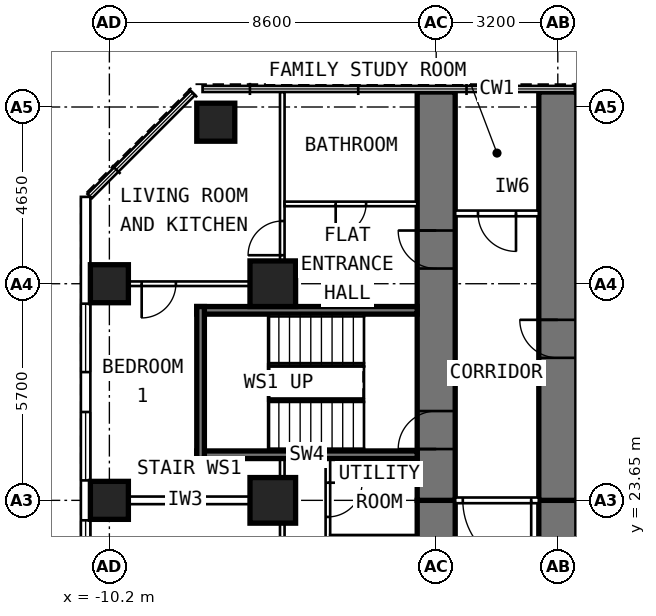
"""IFC4 building model, lengths in metres.
Left out: names, types, materials, properties, quantities, classifications, styles, units other than length and angle.
Written with IfcOpenShell. Run it as: python <this file> out.ifc"""

import sys

from ifc_helpers import new_model, si_unit, direction, frame, frame_2d, origin, origin_2d, place, context, subcontext, project, spatial, rectangle, extrude, element, fill, save


model = new_model("IFC4")
c1 = context("Model", 3, precision=1e-05, world=origin(), true_north=direction((0.0, 1.0)))
c2 = subcontext(c1, "Body", "Model", "MODEL_VIEW")
j1 = project(units=[si_unit("LENGTHUNIT", "METRE"), si_unit("PLANEANGLEUNIT", "RADIAN")], contexts=[c1])
p1 = place(None, origin())
s1 = spatial("IfcSite", under=j1, at=p1, CompositionType="ELEMENT")
p2 = place(p1, origin())
s2 = spatial("IfcBuilding", under=s1, at=p2, CompositionType="ELEMENT")
p3 = place(p2, frame((0.0, 0.0, 50.2)))
s3 = spatial("IfcBuildingStorey", under=s2, at=p3, CompositionType="ELEMENT", Elevation=50.2)
for number, where, z_axis, x_axis in (
    (1, (-10.2, 23.65, 0.0), (0.0, 0.0, 1.0), (0.0, 1.0, 0.0)),
    (2, (-10.2, 29.35, 0.0), (0.0, 0.0, 1.0), (0.0, 1.0, 0.0)),
    (3, (-7.4, 33.6, 0.0), (0.0, 0.0, 1.0), (0.0, 1.0, 0.0)),
):
    element("IfcColumn", number, at=place(p3, frame(where, z_axis=z_axis, x_axis=x_axis)), inside=s3, PredefinedType="COLUMN", context=c2, shape_type="SweptSolid", body=[
        extrude(rectangle(XDim=1.0, YDim=1.0, at=origin_2d()), origin(), (0.0, 0.0, 1.0), 3.6),
    ])
for number, where, z_axis, x_axis in (
    (4, (-5.9, 23.65, 0.0), (0.0, 0.0, 1.0), (0.0, 1.0, 0.0)),
    (5, (-5.9, 29.35, 0.0), (0.0, 0.0, 1.0), (0.0, 1.0, 0.0)),
):
    element("IfcColumn", number, at=place(p3, frame(where, z_axis=z_axis, x_axis=x_axis)), inside=s3, PredefinedType="COLUMN", context=c2, shape_type="SweptSolid", body=[
        extrude(rectangle(XDim=1.2, YDim=1.2, at=origin_2d()), origin(), (0.0, 0.0, 1.0), 3.6),
    ])
p4 = place(p3, frame((-1.6, 17.95, 0.0), z_axis=(0.0, 0.0, 1.0), x_axis=(0.0, 1.0, 0.0)))
e6 = element("IfcWall", 6, at=p4, inside=s3, PredefinedType="SHEAR", context=c2, shape_type="SweptSolid", body=[
    extrude(rectangle(XDim=5.7, YDim=1.0, at=frame_2d((2.85, 0.0))), origin(), (0.0, 0.0, 1.0), 3.6),
])
p5 = place(p3, frame((-1.6, 23.65, 0.0), z_axis=(0.0, 0.0, 1.0), x_axis=(0.0, 1.0, 0.0)))
e7 = element("IfcWall", 7, at=p5, inside=s3, PredefinedType="SHEAR", context=c2, shape_type="SweptSolid", body=[
    extrude(rectangle(XDim=10.745, YDim=1.0, at=frame_2d((5.373, 0.0))), origin(), (0.0, 0.0, 1.0), 3.6),
])
p6 = place(p5, frame((6.1, 0.0, 0.0)))
e8 = element("IfcOpeningElement", 8, at=p6, cuts=e7, PredefinedType="OPENING", context=c2, shape_type="SweptSolid", body=[
    extrude(rectangle(XDim=1.0, YDim=2.1, at=frame_2d((0.5, 1.05))), frame((0.0, 0.512, 0.0), z_axis=(0.0, -1.0, 0.0), x_axis=(1.0, 0.0, 0.0)), (0.0, 0.0, 1.0), 1.024),
])
p7 = place(p5, frame((1.35, 0.0, 0.0)))
e9 = element("IfcOpeningElement", 9, at=p7, cuts=e7, PredefinedType="OPENING", context=c2, shape_type="SweptSolid", body=[
    extrude(rectangle(XDim=1.0, YDim=2.1, at=frame_2d((0.5, 1.05))), frame((0.0, 0.512, 0.0), z_axis=(0.0, -1.0, 0.0), x_axis=(1.0, 0.0, 0.0)), (0.0, 0.0, 1.0), 1.024),
])
p8 = place(p3, frame((1.6, 17.95, 0.0), z_axis=(0.0, 0.0, 1.0), x_axis=(0.0, 1.0, 0.0)))
e10 = element("IfcWall", 10, at=p8, inside=s3, PredefinedType="SHEAR", context=c2, shape_type="SweptSolid", body=[
    extrude(rectangle(XDim=5.7, YDim=1.0, at=frame_2d((2.85, 0.0))), origin(), (0.0, 0.0, 1.0), 3.6),
])
p9 = place(p3, frame((1.6, 23.65, 0.0), z_axis=(0.0, 0.0, 1.0), x_axis=(0.0, 1.0, 0.0)))
e11 = element("IfcWall", 11, at=p9, inside=s3, PredefinedType="SHEAR", context=c2, shape_type="SweptSolid", body=[
    extrude(rectangle(XDim=10.745, YDim=1.0, at=frame_2d((5.373, 0.0))), origin(), (0.0, 0.0, 1.0), 3.6),
])
p10 = place(p9, frame((3.75, 0.0, 0.0)))
e12 = element("IfcOpeningElement", 12, at=p10, cuts=e11, PredefinedType="OPENING", context=c2, shape_type="SweptSolid", body=[
    extrude(rectangle(XDim=1.0, YDim=2.1, at=frame_2d((0.5, 1.05))), frame((0.0, 0.512, 0.0), z_axis=(0.0, -1.0, 0.0), x_axis=(1.0, 0.0, 0.0)), (0.0, 0.0, 1.0), 1.024),
])
p11 = place(p3, frame((-10.825, 6.148, 0.0), z_axis=(0.0, 0.0, 1.0), x_axis=(0.0, 1.0, 0.0)))
e13 = element("IfcWall", 13, at=p11, inside=s3, PredefinedType="SOLIDWALL", context=c2, shape_type="SweptSolid", body=[
    extrude(rectangle(XDim=25.487, YDim=0.25, at=frame_2d((12.744, 0.0))), origin(), (0.0, 0.0, 1.0), 3.35),
])
p12 = place(p11, frame((0.927, 0.0, 0.8)))
e14 = element("IfcOpeningElement", 14, at=p12, cuts=e13, PredefinedType="OPENING", context=c2, shape_type="SweptSolid", body=[
    extrude(rectangle(XDim=1.8, YDim=1.8, at=frame_2d((0.9, 0.9))), frame((0.0, 0.137, 0.0), z_axis=(0.0, -1.0, 0.0), x_axis=(1.0, 0.0, 0.0)), (0.0, 0.0, 1.0), 0.274),
])
p13 = place(p11, frame((3.777, 0.0, 0.8)))
e15 = element("IfcOpeningElement", 15, at=p13, cuts=e13, PredefinedType="OPENING", context=c2, shape_type="SweptSolid", body=[
    extrude(rectangle(XDim=1.8, YDim=1.8, at=frame_2d((0.9, 0.9))), frame((0.0, 0.137, 0.0), z_axis=(0.0, -1.0, 0.0), x_axis=(1.0, 0.0, 0.0)), (0.0, 0.0, 1.0), 0.274),
])
p14 = place(p11, frame((6.627, 0.0, 0.8)))
e16 = element("IfcOpeningElement", 16, at=p14, cuts=e13, PredefinedType="OPENING", context=c2, shape_type="SweptSolid", body=[
    extrude(rectangle(XDim=1.8, YDim=1.8, at=frame_2d((0.9, 0.9))), frame((0.0, 0.137, 0.0), z_axis=(0.0, -1.0, 0.0), x_axis=(1.0, 0.0, 0.0)), (0.0, 0.0, 1.0), 0.274),
])
p15 = place(p11, frame((9.477, 0.0, 0.8)))
e17 = element("IfcOpeningElement", 17, at=p15, cuts=e13, PredefinedType="OPENING", context=c2, shape_type="SweptSolid", body=[
    extrude(rectangle(XDim=1.8, YDim=1.8, at=frame_2d((0.9, 0.9))), frame((0.0, 0.137, 0.0), z_axis=(0.0, -1.0, 0.0), x_axis=(1.0, 0.0, 0.0)), (0.0, 0.0, 1.0), 0.274),
])
p16 = place(p11, frame((12.327, 0.0, 0.8)))
e18 = element("IfcOpeningElement", 18, at=p16, cuts=e13, PredefinedType="OPENING", context=c2, shape_type="SweptSolid", body=[
    extrude(rectangle(XDim=1.8, YDim=1.8, at=frame_2d((0.9, 0.9))), frame((0.0, 0.137, 0.0), z_axis=(0.0, -1.0, 0.0), x_axis=(1.0, 0.0, 0.0)), (0.0, 0.0, 1.0), 0.274),
])
p17 = place(p11, frame((15.177, 0.0, 0.8)))
e19 = element("IfcOpeningElement", 19, at=p17, cuts=e13, PredefinedType="OPENING", context=c2, shape_type="SweptSolid", body=[
    extrude(rectangle(XDim=1.8, YDim=1.8, at=frame_2d((0.9, 0.9))), frame((0.0, 0.137, 0.0), z_axis=(0.0, -1.0, 0.0), x_axis=(1.0, 0.0, 0.0)), (0.0, 0.0, 1.0), 0.274),
])
p18 = place(p11, frame((18.027, 0.0, 0.8)))
e20 = element("IfcOpeningElement", 20, at=p18, cuts=e13, PredefinedType="OPENING", context=c2, shape_type="SweptSolid", body=[
    extrude(rectangle(XDim=1.8, YDim=1.8, at=frame_2d((0.9, 0.9))), frame((0.0, 0.137, 0.0), z_axis=(0.0, -1.0, 0.0), x_axis=(1.0, 0.0, 0.0)), (0.0, 0.0, 1.0), 0.274),
])
p19 = place(p11, frame((20.877, 0.0, 0.8)))
e21 = element("IfcOpeningElement", 21, at=p19, cuts=e13, PredefinedType="OPENING", context=c2, shape_type="SweptSolid", body=[
    extrude(rectangle(XDim=1.8, YDim=1.8, at=frame_2d((0.9, 0.9))), frame((0.0, 0.137, 0.0), z_axis=(0.0, -1.0, 0.0), x_axis=(1.0, 0.0, 0.0)), (0.0, 0.0, 1.0), 0.274),
])
p20 = place(p3, frame((-4.45, 10.1, 0.0), z_axis=(0.0, 0.0, 1.0), x_axis=(0.0, 1.0, 0.0)))
e22 = element("IfcWall", 22, at=p20, inside=s3, PredefinedType="PARTITIONING", context=c2, shape_type="SweptSolid", body=[
    extrude(rectangle(XDim=14.65, YDim=0.12, at=frame_2d((7.325, 0.0))), origin(), (0.0, 0.0, 1.0), 3.35),
])
p21 = place(p20, frame((0.375, 0.0, 0.0)))
e23 = element("IfcOpeningElement", 23, at=p21, cuts=e22, PredefinedType="OPENING", context=c2, shape_type="SweptSolid", body=[
    extrude(rectangle(XDim=0.9, YDim=2.1, at=frame_2d((0.45, 1.05))), frame((0.0, 0.072, 0.0), z_axis=(0.0, -1.0, 0.0), x_axis=(1.0, 0.0, 0.0)), (0.0, 0.0, 1.0), 0.144),
])
p22 = place(p20, frame((2.275, 0.0, 0.0)))
e24 = element("IfcOpeningElement", 24, at=p22, cuts=e22, PredefinedType="OPENING", context=c2, shape_type="SweptSolid", body=[
    extrude(rectangle(XDim=0.8, YDim=2.1, at=frame_2d((0.4, 1.05))), frame((0.0, 0.072, 0.0), z_axis=(0.0, -1.0, 0.0), x_axis=(1.0, 0.0, 0.0)), (0.0, 0.0, 1.0), 0.144),
])
p23 = place(p20, frame((4.075, 0.0, 0.0)))
e25 = element("IfcOpeningElement", 25, at=p23, cuts=e22, PredefinedType="OPENING", context=c2, shape_type="SweptSolid", body=[
    extrude(rectangle(XDim=0.9, YDim=2.1, at=frame_2d((0.45, 1.05))), frame((0.0, 0.072, 0.0), z_axis=(0.0, -1.0, 0.0), x_axis=(1.0, 0.0, 0.0)), (0.0, 0.0, 1.0), 0.144),
])
p24 = place(p20, frame((6.1, 0.0, 0.0)))
e26 = element("IfcOpeningElement", 26, at=p24, cuts=e22, PredefinedType="OPENING", context=c2, shape_type="SweptSolid", body=[
    extrude(rectangle(XDim=0.9, YDim=2.1, at=frame_2d((0.45, 1.05))), frame((0.0, 0.072, 0.0), z_axis=(0.0, -1.0, 0.0), x_axis=(1.0, 0.0, 0.0)), (0.0, 0.0, 1.0), 0.144),
])
p25 = place(p20, frame((8.729, 0.0, 0.0)))
e27 = element("IfcOpeningElement", 27, at=p25, cuts=e22, PredefinedType="OPENING", context=c2, shape_type="SweptSolid", body=[
    extrude(rectangle(XDim=0.8, YDim=2.1, at=frame_2d((0.4, 1.05))), frame((0.0, 0.072, 0.0), z_axis=(0.0, -1.0, 0.0), x_axis=(1.0, 0.0, 0.0)), (0.0, 0.0, 1.0), 0.144),
])
p26 = place(p20, frame((11.193, 0.0, 0.0)))
e28 = element("IfcOpeningElement", 28, at=p26, cuts=e22, PredefinedType="OPENING", context=c2, shape_type="SweptSolid", body=[
    extrude(rectangle(XDim=0.8, YDim=2.1, at=frame_2d((0.4, 1.05))), frame((0.0, 0.072, 0.0), z_axis=(0.0, -1.0, 0.0), x_axis=(1.0, 0.0, 0.0)), (0.0, 0.0, 1.0), 0.144),
])
p27 = place(p20, frame((13.114, 0.0, 0.0)))
e29 = element("IfcOpeningElement", 29, at=p27, cuts=e22, PredefinedType="OPENING", context=c2, shape_type="SweptSolid", body=[
    extrude(rectangle(XDim=0.9, YDim=2.1, at=frame_2d((0.45, 1.05))), frame((0.0, 0.072, 0.0), z_axis=(0.0, -1.0, 0.0), x_axis=(1.0, 0.0, 0.0)), (0.0, 0.0, 1.0), 0.144),
])
p28 = place(p3, frame((-5.65, 9.6, 0.0), z_axis=(0.0, 0.0, 1.0), x_axis=(0.0, 1.0, 0.0)))
e30 = element("IfcWall", 30, at=p28, inside=s3, PredefinedType="PARTITIONING", context=c2, shape_type="SweptSolid", body=[
    extrude(rectangle(XDim=15.15, YDim=0.12, at=frame_2d((7.575, 0.0))), origin(), (0.0, 0.0, 1.0), 3.35),
])
p29 = place(p28, frame((1.0, 0.0, 0.0)))
e31 = element("IfcOpeningElement", 31, at=p29, cuts=e30, PredefinedType="OPENING", context=c2, shape_type="SweptSolid", body=[
    extrude(rectangle(XDim=0.9, YDim=2.1, at=frame_2d((0.45, 1.05))), frame((0.0, 0.072, 0.0), z_axis=(0.0, -1.0, 0.0), x_axis=(1.0, 0.0, 0.0)), (0.0, 0.0, 1.0), 0.144),
])
p30 = place(p28, frame((3.625, 0.0, 0.0)))
e32 = element("IfcOpeningElement", 32, at=p30, cuts=e30, PredefinedType="OPENING", context=c2, shape_type="SweptSolid", body=[
    extrude(rectangle(XDim=0.9, YDim=2.1, at=frame_2d((0.45, 1.05))), frame((0.0, 0.072, 0.0), z_axis=(0.0, -1.0, 0.0), x_axis=(1.0, 0.0, 0.0)), (0.0, 0.0, 1.0), 0.144),
])
p31 = place(p28, frame((6.475, 0.0, 0.0)))
e33 = element("IfcOpeningElement", 33, at=p31, cuts=e30, PredefinedType="OPENING", context=c2, shape_type="SweptSolid", body=[
    extrude(rectangle(XDim=0.9, YDim=2.1, at=frame_2d((0.45, 1.05))), frame((0.0, 0.072, 0.0), z_axis=(0.0, -1.0, 0.0), x_axis=(1.0, 0.0, 0.0)), (0.0, 0.0, 1.0), 0.144),
])
p32 = place(p28, frame((10.75, 0.0, 0.0)))
e34 = element("IfcOpeningElement", 34, at=p32, cuts=e30, PredefinedType="OPENING", context=c2, shape_type="SweptSolid", body=[
    extrude(rectangle(XDim=0.9, YDim=2.1, at=frame_2d((0.45, 1.05))), frame((0.0, 0.072, 0.0), z_axis=(0.0, -1.0, 0.0), x_axis=(1.0, 0.0, 0.0)), (0.0, 0.0, 1.0), 0.144),
])
p33 = place(p3, frame((-2.1, 22.678, 0.0), z_axis=(0.0, 0.0, 1.0), x_axis=(-1.0, 0.0, 0.0)))
e35 = element("IfcWall", 35, at=p33, inside=s3, PredefinedType="PARTITIONING", context=c2, shape_type="SweptSolid", body=[
    extrude(rectangle(XDim=2.29, YDim=0.12, at=frame_2d((1.145, 0.0))), origin(), (0.0, 0.0, 1.0), 3.35),
])
p34 = place(p3, frame((-5.71, 23.65, 0.0), z_axis=(0.0, 0.0, 1.0), x_axis=(-1.0, 0.0, 0.0)))
e36 = element("IfcWall", 36, at=p34, inside=s3, PredefinedType="PARTITIONING", context=c2, shape_type="SweptSolid", body=[
    extrude(rectangle(XDim=4.99, YDim=0.2, at=frame_2d((2.495, 0.0))), origin(), (0.0, 0.0, 1.0), 2.45),
])
p35 = place(p3, frame((-5.71, 29.35, 0.0), z_axis=(0.0, 0.0, 1.0), x_axis=(-1.0, 0.0, 0.0)))
e37 = element("IfcWall", 37, at=p35, inside=s3, PredefinedType="PARTITIONING", context=c2, shape_type="SweptSolid", body=[
    extrude(rectangle(XDim=4.99, YDim=0.12, at=frame_2d((2.495, 0.0))), origin(), (0.0, 0.0, 1.0), 2.45),
])
p36 = place(p35, frame((2.74, 0.0, 0.0)))
e38 = element("IfcOpeningElement", 38, at=p36, cuts=e37, PredefinedType="OPENING", context=c2, shape_type="SweptSolid", body=[
    extrude(rectangle(XDim=0.9, YDim=2.1, at=frame_2d((0.45, 1.05))), frame((0.0, 0.072, 0.0), z_axis=(0.0, -1.0, 0.0), x_axis=(1.0, 0.0, 0.0)), (0.0, 0.0, 1.0), 0.144),
])
p37 = place(p3, frame((-5.65, 28.95, 0.0), z_axis=(0.0, 0.0, 1.0), x_axis=(0.0, 1.0, 0.0)))
e39 = element("IfcWall", 39, at=p37, inside=s3, PredefinedType="PARTITIONING", context=c2, shape_type="SweptSolid", body=[
    extrude(rectangle(XDim=5.445, YDim=0.12, at=frame_2d((2.723, 0.0))), origin(), (0.0, 0.0, 1.0), 3.35),
])
p38 = place(p37, frame((1.15, 0.0, 0.0)))
e40 = element("IfcOpeningElement", 40, at=p38, cuts=e39, PredefinedType="OPENING", context=c2, shape_type="SweptSolid", body=[
    extrude(rectangle(XDim=0.9, YDim=2.1, at=frame_2d((0.45, 1.05))), frame((0.0, 0.072, 0.0), z_axis=(0.0, -1.0, 0.0), x_axis=(1.0, 0.0, 0.0)), (0.0, 0.0, 1.0), 0.144),
])
p39 = place(p3, frame((-2.1, 31.45, 0.0), z_axis=(0.0, 0.0, 1.0), x_axis=(-1.0, 0.0, 0.0)))
e41 = element("IfcWall", 41, at=p39, inside=s3, PredefinedType="PARTITIONING", context=c2, shape_type="SweptSolid", body=[
    extrude(rectangle(XDim=3.49, YDim=0.12, at=frame_2d((1.745, 0.0))), origin(), (0.0, 0.0, 1.0), 3.35),
])
p40 = place(p39, frame((1.345, 0.0, 0.0)))
e42 = element("IfcOpeningElement", 42, at=p40, cuts=e41, PredefinedType="OPENING", context=c2, shape_type="SweptSolid", body=[
    extrude(rectangle(XDim=0.8, YDim=2.1, at=frame_2d((0.4, 1.05))), frame((0.0, 0.072, 0.0), z_axis=(0.0, -1.0, 0.0), x_axis=(1.0, 0.0, 0.0)), (0.0, 0.0, 1.0), 0.144),
])
p41 = place(p3, frame((2.1, 26.5, 0.0), z_axis=(0.0, 0.0, 1.0), x_axis=(1.0, 0.0, 0.0)))
e43 = element("IfcWall", 43, at=p41, inside=s3, PredefinedType="PARTITIONING", context=c2, shape_type="SweptSolid", body=[
    extrude(rectangle(XDim=8.6, YDim=0.2, at=frame_2d((4.3, 0.0))), origin(), (0.0, 0.0, 1.0), 3.35),
])
p42 = place(p3, frame((1.1, 31.2, 0.0), z_axis=(0.0, 0.0, 1.0), x_axis=(-1.0, 0.0, 0.0)))
e44 = element("IfcWall", 44, at=p42, inside=s3, PredefinedType="PARTITIONING", context=c2, shape_type="SweptSolid", body=[
    extrude(rectangle(XDim=2.2, YDim=0.15, at=frame_2d((1.1, 0.0))), origin(), (0.0, 0.0, 1.0), 3.35),
])
p43 = place(p42, frame((0.6, 0.0, 0.0)))
e45 = element("IfcOpeningElement", 45, at=p43, cuts=e44, PredefinedType="OPENING", context=c2, shape_type="SweptSolid", body=[
    extrude(rectangle(XDim=1.0, YDim=2.1, at=frame_2d((0.5, 1.05))), frame((0.0, 0.087, 0.0), z_axis=(0.0, -1.0, 0.0), x_axis=(1.0, 0.0, 0.0)), (0.0, 0.0, 1.0), 0.174),
])
p44 = place(p3, frame((1.1, 23.65, 0.0), z_axis=(0.0, 0.0, 1.0), x_axis=(-1.0, 0.0, 0.0)))
e46 = element("IfcWall", 46, at=p44, inside=s3, PredefinedType="PARTITIONING", context=c2, shape_type="SweptSolid", body=[
    extrude(rectangle(XDim=2.2, YDim=0.15, at=frame_2d((1.1, 0.0))), origin(), (0.0, 0.0, 1.0), 3.35),
])
p45 = place(p44, frame((0.2, 0.0, 0.0)))
e47 = element("IfcOpeningElement", 47, at=p45, cuts=e46, PredefinedType="OPENING", context=c2, shape_type="SweptSolid", body=[
    extrude(rectangle(XDim=1.8, YDim=2.1, at=frame_2d((0.9, 1.05))), frame((0.0, 0.087, 0.0), z_axis=(0.0, -1.0, 0.0), x_axis=(1.0, 0.0, 0.0)), (0.0, 0.0, 1.0), 0.174),
])
for number, where, z_axis, x_axis in (
    (48, (-2.1, 24.85, 0.0), (0.0, 0.0, 1.0), (-1.0, 0.0, 0.0)),
    (49, (-2.1, 28.65, 0.0), (0.0, 0.0, 1.0), (-1.0, 0.0, 0.0)),
):
    element("IfcWall", number, at=place(p3, frame(where, z_axis=z_axis, x_axis=x_axis)), inside=s3, PredefinedType="SHEAR", context=c2, shape_type="SweptSolid", body=[
        extrude(rectangle(XDim=5.8, YDim=0.2, at=frame_2d((2.9, 0.0))), origin(), (0.0, 0.0, 1.0), 3.33),
    ])
p46 = place(p3, frame((-7.8, 24.75, 0.0), z_axis=(0.0, 0.0, 1.0), x_axis=(0.0, 1.0, 0.0)))
e50 = element("IfcWall", 50, at=p46, inside=s3, PredefinedType="SHEAR", context=c2, shape_type="SweptSolid", body=[
    extrude(rectangle(XDim=4.0, YDim=0.2, at=frame_2d((2.0, 0.0))), origin(), (0.0, 0.0, 1.0), 3.33),
])
p47 = place(p17, origin())
e51 = element("IfcWindow", 51, at=p47, inside=s3, PartitioningType="SINGLE_PANEL", PredefinedType="WINDOW", context=c2, shape_type="SweptSolid", body=[
    extrude(rectangle(XDim=1.8, YDim=1.8, at=frame_2d((0.9, 0.9))), frame((0.0, 0.03, 0.0), z_axis=(0.0, -1.0, 0.0), x_axis=(1.0, 0.0, 0.0)), (0.0, 0.0, 1.0), 0.06),
])
fill(e19, e51)
p48 = place(p18, origin())
e52 = element("IfcWindow", 52, at=p48, inside=s3, PartitioningType="SINGLE_PANEL", PredefinedType="WINDOW", context=c2, shape_type="SweptSolid", body=[
    extrude(rectangle(XDim=1.8, YDim=1.8, at=frame_2d((0.9, 0.9))), frame((0.0, 0.03, 0.0), z_axis=(0.0, -1.0, 0.0), x_axis=(1.0, 0.0, 0.0)), (0.0, 0.0, 1.0), 0.06),
])
fill(e20, e52)
p49 = place(p19, origin())
e53 = element("IfcWindow", 53, at=p49, inside=s3, PartitioningType="SINGLE_PANEL", PredefinedType="WINDOW", context=c2, shape_type="SweptSolid", body=[
    extrude(rectangle(XDim=1.8, YDim=1.8, at=frame_2d((0.9, 0.9))), frame((0.0, 0.03, 0.0), z_axis=(0.0, -1.0, 0.0), x_axis=(1.0, 0.0, 0.0)), (0.0, 0.0, 1.0), 0.06),
])
fill(e21, e53)
p50 = place(p27, frame((0.9, 0.0, 0.0), z_axis=(0.0, 0.0, 1.0), x_axis=(-1.0, 0.0, 0.0)))
e54 = element("IfcDoor", 54, at=p50, inside=s3, OperationType="SINGLE_SWING_LEFT", PredefinedType="DOOR", context=c2, shape_type="SweptSolid", body=[
    extrude(rectangle(XDim=0.9, YDim=2.1, at=frame_2d((0.45, 1.05))), frame((0.0, 0.025, 0.0), z_axis=(0.0, -1.0, 0.0), x_axis=(1.0, 0.0, 0.0)), (0.0, 0.0, 1.0), 0.05),
])
fill(e29, e54)
p51 = place(p36, origin())
e55 = element("IfcDoor", 55, at=p51, inside=s3, OperationType="SINGLE_SWING_RIGHT", PredefinedType="DOOR", context=c2, shape_type="SweptSolid", body=[
    extrude(rectangle(XDim=0.9, YDim=2.1, at=frame_2d((0.45, 1.05))), frame((0.0, 0.025, 0.0), z_axis=(0.0, -1.0, 0.0), x_axis=(1.0, 0.0, 0.0)), (0.0, 0.0, 1.0), 0.05),
])
fill(e38, e55)
p52 = place(p38, origin())
e56 = element("IfcDoor", 56, at=p52, inside=s3, OperationType="SINGLE_SWING_LEFT", PredefinedType="DOOR", context=c2, shape_type="SweptSolid", body=[
    extrude(rectangle(XDim=0.9, YDim=2.1, at=frame_2d((0.45, 1.05))), frame((0.0, 0.025, 0.0), z_axis=(0.0, -1.0, 0.0), x_axis=(1.0, 0.0, 0.0)), (0.0, 0.0, 1.0), 0.05),
])
fill(e40, e56)
p53 = place(p40, origin())
e57 = element("IfcDoor", 57, at=p53, inside=s3, OperationType="SINGLE_SWING_RIGHT", PredefinedType="DOOR", context=c2, shape_type="SweptSolid", body=[
    extrude(rectangle(XDim=0.8, YDim=2.1, at=frame_2d((0.4, 1.05))), frame((0.0, 0.025, 0.0), z_axis=(0.0, -1.0, 0.0), x_axis=(1.0, 0.0, 0.0)), (0.0, 0.0, 1.0), 0.05),
])
fill(e42, e57)
p54 = place(p6, origin())
e58 = element("IfcDoor", 58, at=p54, inside=s3, OperationType="SINGLE_SWING_RIGHT", PredefinedType="DOOR", context=c2, shape_type="SweptSolid", body=[
    extrude(rectangle(XDim=1.0, YDim=2.1, at=frame_2d((0.5, 1.05))), frame((0.0, 0.25, 0.0), z_axis=(0.0, -1.0, 0.0), x_axis=(1.0, 0.0, 0.0)), (0.0, 0.0, 1.0), 0.5),
])
fill(e8, e58)
p55 = place(p10, origin())
e59 = element("IfcDoor", 59, at=p55, inside=s3, OperationType="SINGLE_SWING_RIGHT", PredefinedType="DOOR", context=c2, shape_type="SweptSolid", body=[
    extrude(rectangle(XDim=1.0, YDim=2.1, at=frame_2d((0.5, 1.05))), frame((0.0, 0.25, 0.0), z_axis=(0.0, -1.0, 0.0), x_axis=(1.0, 0.0, 0.0)), (0.0, 0.0, 1.0), 0.5),
])
fill(e12, e59)
p56 = place(p43, origin())
e60 = element("IfcDoor", 60, at=p56, inside=s3, OperationType="SINGLE_SWING_LEFT", PredefinedType="DOOR", context=c2, shape_type="SweptSolid", body=[
    extrude(rectangle(XDim=1.0, YDim=2.1, at=frame_2d((0.5, 1.05))), frame((0.0, 0.025, 0.0), z_axis=(0.0, -1.0, 0.0), x_axis=(1.0, 0.0, 0.0)), (0.0, 0.0, 1.0), 0.05),
])
fill(e45, e60)
p57 = place(p45, origin())
e61 = element("IfcDoor", 61, at=p57, inside=s3, OperationType="DOUBLE_DOOR_DOUBLE_SWING", PredefinedType="DOOR", context=c2, shape_type="SweptSolid", body=[
    extrude(rectangle(XDim=1.8, YDim=2.1, at=frame_2d((0.9, 1.05))), frame((0.0, 0.025, 0.0), z_axis=(0.0, -1.0, 0.0), x_axis=(1.0, 0.0, 0.0)), (0.0, 0.0, 1.0), 0.05),
])
fill(e47, e61)
p58 = place(p7, origin())
e62 = element("IfcDoor", 62, at=p58, inside=s3, OperationType="SINGLE_SWING_LEFT", PredefinedType="DOOR", context=c2, shape_type="SweptSolid", body=[
    extrude(rectangle(XDim=1.0, YDim=2.1, at=frame_2d((0.5, 1.05))), frame((0.0, 0.25, 0.0), z_axis=(0.0, -1.0, 0.0), x_axis=(1.0, 0.0, 0.0)), (0.0, 0.0, 1.0), 0.5),
])
fill(e9, e62)
save(model, sys.argv[1])
